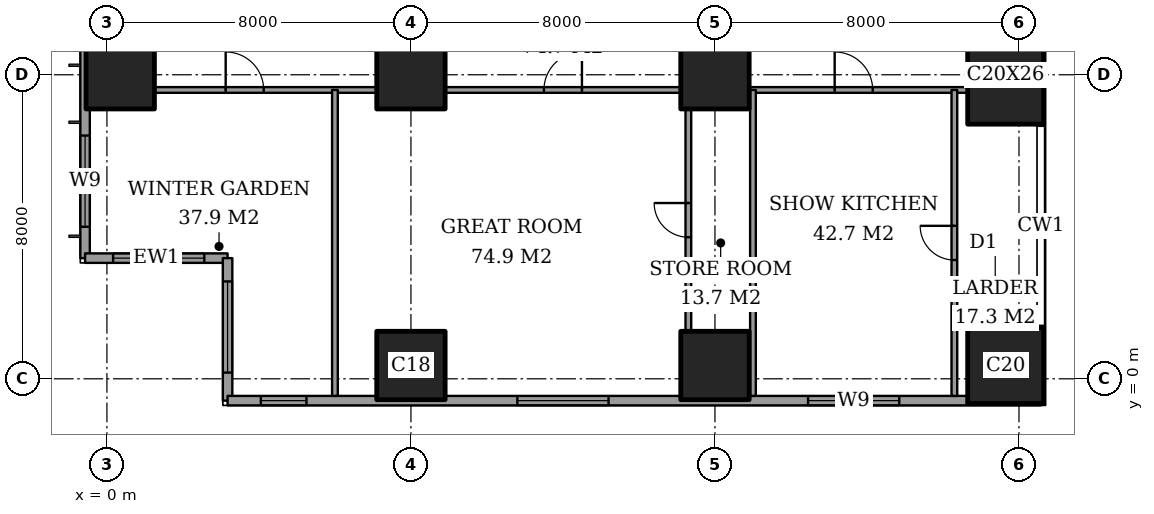
"""IFC4 building model, lengths in metres.
Left out: names, types, materials, properties, quantities, classifications, styles, units other than length and angle.
Written with IfcOpenShell. Run it as: python <this file> out.ifc"""

import sys

from ifc_helpers import new_model, si_unit, direction, frame, frame_2d, origin, origin_2d, place, context, subcontext, project, spatial, rectangle, extrude, element, fill, save


model = new_model("IFC4")
c1 = context("Model", 3, precision=1e-05, world=origin(), true_north=direction((0.0, 1.0)))
c2 = subcontext(c1, "Body", "Model", "MODEL_VIEW")
j1 = project(units=[si_unit("LENGTHUNIT", "METRE"), si_unit("PLANEANGLEUNIT", "RADIAN")], contexts=[c1])
p1 = place(None, origin())
s1 = spatial("IfcSite", under=j1, at=p1, CompositionType="ELEMENT")
p2 = place(p1, origin())
s2 = spatial("IfcBuilding", under=s1, at=p2, CompositionType="ELEMENT")
p3 = place(p2, frame((0.0, 0.0, 189.4)))
s3 = spatial("IfcBuildingStorey", under=s2, at=p3, CompositionType="ELEMENT", Elevation=189.4)
for number, where, z_axis, x_axis in (
    (1, (0.35, 8.0, 0.0), (0.0, 0.0, 1.0), (1.0, 0.0, 0.0)),
    (2, (8.0, 0.35, 0.0), (0.0, 0.0, 1.0), (1.0, 0.0, 0.0)),
    (3, (8.0, 8.0, 0.0), (0.0, 0.0, 1.0), (1.0, 0.0, 0.0)),
    (4, (16.0, 0.35, 0.0), (0.0, 0.0, 1.0), (1.0, 0.0, 0.0)),
    (5, (16.0, 8.0, 0.0), (0.0, 0.0, 1.0), (1.0, 0.0, 0.0)),
):
    element("IfcColumn", number, at=place(p3, frame(where, z_axis=z_axis, x_axis=x_axis)), inside=s3, PredefinedType="COLUMN", context=c2, shape_type="SweptSolid", body=[
        extrude(rectangle(XDim=1.8, YDim=1.8, at=origin_2d()), origin(), (0.0, 0.0, 1.0), 3.6),
    ])
p4 = place(p3, frame((23.65, 0.35, 0.0), z_axis=(0.0, 0.0, 1.0), x_axis=(1.0, 0.0, 0.0)))
e6 = element("IfcColumn", 6, at=p4, inside=s3, PredefinedType="COLUMN", context=c2, shape_type="SweptSolid", body=[
    extrude(rectangle(XDim=2.0, YDim=2.0, at=origin_2d()), origin(), (0.0, 0.0, 1.0), 3.6),
])
p5 = place(p3, frame((23.65, 8.0, 0.0), z_axis=(0.0, 0.0, 1.0), x_axis=(1.0, 0.0, 0.0)))
e7 = element("IfcColumn", 7, at=p5, inside=s3, PredefinedType="COLUMN", context=c2, shape_type="SweptSolid", body=[
    extrude(rectangle(XDim=2.0, YDim=2.6, at=origin_2d()), origin(), (0.0, 0.0, 1.0), 3.6),
])
p6 = place(p3, frame((-0.575, 44.825, 0.0), z_axis=(0.0, 0.0, 1.0), x_axis=(0.0, -1.0, 0.0)))
e8 = element("IfcWall", 8, at=p6, inside=s3, PredefinedType="SOLIDWALL", context=c2, shape_type="SweptSolid", body=[
    extrude(rectangle(XDim=41.65, YDim=0.25, at=frame_2d((20.825, 0.0))), origin(), (0.0, 0.0, 1.0), 3.6),
])
p7 = place(p6, frame((0.825, 0.0, 0.2)))
e9 = element("IfcOpeningElement", 9, at=p7, cuts=e8, PredefinedType="OPENING", context=c2, shape_type="SweptSolid", body=[
    extrude(rectangle(XDim=2.4, YDim=2.4, at=frame_2d((1.2, 1.2))), frame((0.0, 0.135, 0.0), z_axis=(0.0, -1.0, 0.0), x_axis=(1.0, 0.0, 0.0)), (0.0, 0.0, 1.0), 0.27),
])
p8 = place(p6, frame((6.05, 0.0, 0.2)))
e10 = element("IfcOpeningElement", 10, at=p8, cuts=e8, PredefinedType="OPENING", context=c2, shape_type="SweptSolid", body=[
    extrude(rectangle(XDim=1.2, YDim=2.4, at=frame_2d((0.6, 1.2))), frame((0.0, 0.135, 0.0), z_axis=(0.0, -1.0, 0.0), x_axis=(1.0, 0.0, 0.0)), (0.0, 0.0, 1.0), 0.27),
])
p9 = place(p6, frame((8.475, 0.0, 0.2)))
e11 = element("IfcOpeningElement", 11, at=p9, cuts=e8, PredefinedType="OPENING", context=c2, shape_type="SweptSolid", body=[
    extrude(rectangle(XDim=2.4, YDim=2.4, at=frame_2d((1.2, 1.2))), frame((0.0, 0.135, 0.0), z_axis=(0.0, -1.0, 0.0), x_axis=(1.0, 0.0, 0.0)), (0.0, 0.0, 1.0), 0.27),
])
p10 = place(p6, frame((15.625, 0.0, 0.2)))
e12 = element("IfcOpeningElement", 12, at=p10, cuts=e8, PredefinedType="OPENING", context=c2, shape_type="SweptSolid", body=[
    extrude(rectangle(XDim=2.4, YDim=2.4, at=frame_2d((1.2, 1.2))), frame((0.0, 0.135, 0.0), z_axis=(0.0, -1.0, 0.0), x_axis=(1.0, 0.0, 0.0)), (0.0, 0.0, 1.0), 0.27),
])
p11 = place(p6, frame((23.625, 0.0, 0.2)))
e13 = element("IfcOpeningElement", 13, at=p11, cuts=e8, PredefinedType="OPENING", context=c2, shape_type="SweptSolid", body=[
    extrude(rectangle(XDim=2.4, YDim=2.4, at=frame_2d((1.2, 1.2))), frame((0.0, 0.135, 0.0), z_axis=(0.0, -1.0, 0.0), x_axis=(1.0, 0.0, 0.0)), (0.0, 0.0, 1.0), 0.27),
])
p12 = place(p6, frame((30.775, 0.0, 0.2)))
e14 = element("IfcOpeningElement", 14, at=p12, cuts=e8, PredefinedType="OPENING", context=c2, shape_type="SweptSolid", body=[
    extrude(rectangle(XDim=2.4, YDim=2.4, at=frame_2d((1.2, 1.2))), frame((0.0, 0.135, 0.0), z_axis=(0.0, -1.0, 0.0), x_axis=(1.0, 0.0, 0.0)), (0.0, 0.0, 1.0), 0.27),
])
p13 = place(p6, frame((34.55, 0.0, 0.2)))
e15 = element("IfcOpeningElement", 15, at=p13, cuts=e8, PredefinedType="OPENING", context=c2, shape_type="SweptSolid", body=[
    extrude(rectangle(XDim=1.2, YDim=2.4, at=frame_2d((0.6, 1.2))), frame((0.0, 0.135, 0.0), z_axis=(0.0, -1.0, 0.0), x_axis=(1.0, 0.0, 0.0)), (0.0, 0.0, 1.0), 0.27),
])
p14 = place(p6, frame((38.425, 0.0, 0.2)))
e16 = element("IfcOpeningElement", 16, at=p14, cuts=e8, PredefinedType="OPENING", context=c2, shape_type="SweptSolid", body=[
    extrude(rectangle(XDim=2.4, YDim=2.4, at=frame_2d((1.2, 1.2))), frame((0.0, 0.135, 0.0), z_axis=(0.0, -1.0, 0.0), x_axis=(1.0, 0.0, 0.0)), (0.0, 0.0, 1.0), 0.27),
])
p15 = place(p3, frame((-0.575, 3.175, 0.0), z_axis=(0.0, 0.0, 1.0), x_axis=(1.0, 0.0, 0.0)))
e17 = element("IfcWall", 17, at=p15, inside=s3, PredefinedType="SOLIDWALL", context=c2, shape_type="SweptSolid", body=[
    extrude(rectangle(XDim=3.75, YDim=0.25, at=frame_2d((1.875, 0.0))), origin(), (0.0, 0.0, 1.0), 3.6),
])
p16 = place(p15, frame((0.738, 0.0, 0.2)))
e18 = element("IfcOpeningElement", 18, at=p16, cuts=e17, PredefinedType="OPENING", context=c2, shape_type="SweptSolid", body=[
    extrude(rectangle(XDim=2.4, YDim=2.4, at=frame_2d((1.2, 1.2))), frame((0.0, 0.135, 0.0), z_axis=(0.0, -1.0, 0.0), x_axis=(1.0, 0.0, 0.0)), (0.0, 0.0, 1.0), 0.27),
])
p17 = place(p3, frame((3.175, 3.175, 0.0), z_axis=(0.0, 0.0, 1.0), x_axis=(0.0, -1.0, 0.0)))
e19 = element("IfcWall", 19, at=p17, inside=s3, PredefinedType="SOLIDWALL", context=c2, shape_type="SweptSolid", body=[
    extrude(rectangle(XDim=3.75, YDim=0.25, at=frame_2d((1.875, 0.0))), origin(), (0.0, 0.0, 1.0), 3.6),
])
p18 = place(p17, frame((0.613, 0.0, 0.2)))
e20 = element("IfcOpeningElement", 20, at=p18, cuts=e19, PredefinedType="OPENING", context=c2, shape_type="SweptSolid", body=[
    extrude(rectangle(XDim=2.4, YDim=2.4, at=frame_2d((1.2, 1.2))), frame((0.0, 0.135, 0.0), z_axis=(0.0, -1.0, 0.0), x_axis=(1.0, 0.0, 0.0)), (0.0, 0.0, 1.0), 0.27),
])
p19 = place(p3, frame((3.175, -0.575, 0.0), z_axis=(0.0, 0.0, 1.0), x_axis=(1.0, 0.0, 0.0)))
e21 = element("IfcWall", 21, at=p19, inside=s3, PredefinedType="SOLIDWALL", context=c2, shape_type="SweptSolid", body=[
    extrude(rectangle(XDim=21.4, YDim=0.25, at=frame_2d((10.7, 0.0))), origin(), (0.0, 0.0, 1.0), 3.6),
])
p20 = place(p19, frame((0.875, 0.0, 0.2)))
e22 = element("IfcOpeningElement", 22, at=p20, cuts=e21, PredefinedType="OPENING", context=c2, shape_type="SweptSolid", body=[
    extrude(rectangle(XDim=1.2, YDim=2.4, at=frame_2d((0.6, 1.2))), frame((0.0, 0.135, 0.0), z_axis=(0.0, -1.0, 0.0), x_axis=(1.0, 0.0, 0.0)), (0.0, 0.0, 1.0), 0.27),
])
p21 = place(p19, frame((7.625, 0.0, 0.2)))
e23 = element("IfcOpeningElement", 23, at=p21, cuts=e21, PredefinedType="OPENING", context=c2, shape_type="SweptSolid", body=[
    extrude(rectangle(XDim=2.4, YDim=2.4, at=frame_2d((1.2, 1.2))), frame((0.0, 0.135, 0.0), z_axis=(0.0, -1.0, 0.0), x_axis=(1.0, 0.0, 0.0)), (0.0, 0.0, 1.0), 0.27),
])
p22 = place(p19, frame((15.275, 0.0, 0.2)))
e24 = element("IfcOpeningElement", 24, at=p22, cuts=e21, PredefinedType="OPENING", context=c2, shape_type="SweptSolid", body=[
    extrude(rectangle(XDim=2.4, YDim=2.4, at=frame_2d((1.2, 1.2))), frame((0.0, 0.135, 0.0), z_axis=(0.0, -1.0, 0.0), x_axis=(1.0, 0.0, 0.0)), (0.0, 0.0, 1.0), 0.27),
])
p23 = place(p3, frame((1.25, 7.6, 0.0), z_axis=(0.0, 0.0, 1.0), x_axis=(1.0, 0.0, 0.0)))
e25 = element("IfcWall", 25, at=p23, inside=s3, PredefinedType="PARTITIONING", context=c2, shape_type="SweptSolid", body=[
    extrude(rectangle(XDim=5.85, YDim=0.15, at=frame_2d((2.925, 0.0))), origin(), (0.0, 0.0, 1.0), 3.35),
])
p24 = place(p23, frame((1.875, 0.0, 0.0)))
e26 = element("IfcOpeningElement", 26, at=p24, cuts=e25, PredefinedType="OPENING", context=c2, shape_type="SweptSolid", body=[
    extrude(rectangle(XDim=1.0, YDim=2.1, at=frame_2d((0.5, 1.05))), frame((0.0, 0.085, 0.0), z_axis=(0.0, -1.0, 0.0), x_axis=(1.0, 0.0, 0.0)), (0.0, 0.0, 1.0), 0.17),
])
p25 = place(p3, frame((8.9, 7.6, 0.0), z_axis=(0.0, 0.0, 1.0), x_axis=(1.0, 0.0, 0.0)))
e27 = element("IfcWall", 27, at=p25, inside=s3, PredefinedType="PARTITIONING", context=c2, shape_type="SweptSolid", body=[
    extrude(rectangle(XDim=6.2, YDim=0.15, at=frame_2d((3.1, 0.0))), origin(), (0.0, 0.0, 1.0), 3.35),
])
p26 = place(p25, frame((2.6, 0.0, 0.0)))
e28 = element("IfcOpeningElement", 28, at=p26, cuts=e27, PredefinedType="OPENING", context=c2, shape_type="SweptSolid", body=[
    extrude(rectangle(XDim=1.0, YDim=2.1, at=frame_2d((0.5, 1.05))), frame((0.0, 0.085, 0.0), z_axis=(0.0, -1.0, 0.0), x_axis=(1.0, 0.0, 0.0)), (0.0, 0.0, 1.0), 0.17),
])
p27 = place(p3, frame((16.9, 7.6, 0.0), z_axis=(0.0, 0.0, 1.0), x_axis=(1.0, 0.0, 0.0)))
e29 = element("IfcWall", 29, at=p27, inside=s3, PredefinedType="PARTITIONING", context=c2, shape_type="SweptSolid", body=[
    extrude(rectangle(XDim=5.75, YDim=0.15, at=frame_2d((2.875, 0.0))), origin(), (0.0, 0.0, 1.0), 3.35),
])
p28 = place(p27, frame((2.25, 0.0, 0.0)))
e30 = element("IfcOpeningElement", 30, at=p28, cuts=e29, PredefinedType="OPENING", context=c2, shape_type="SweptSolid", body=[
    extrude(rectangle(XDim=1.0, YDim=2.1, at=frame_2d((0.5, 1.05))), frame((0.0, 0.085, 0.0), z_axis=(0.0, -1.0, 0.0), x_axis=(1.0, 0.0, 0.0)), (0.0, 0.0, 1.0), 0.17),
])
p29 = place(p3, frame((6.0, -0.45, 0.0), z_axis=(0.0, 0.0, 1.0), x_axis=(0.0, 1.0, 0.0)))
e31 = element("IfcWall", 31, at=p29, inside=s3, PredefinedType="PARTITIONING", context=c2, shape_type="SweptSolid", body=[
    extrude(rectangle(XDim=8.05, YDim=0.15, at=frame_2d((4.025, 0.0))), origin(), (0.0, 0.0, 1.0), 3.35),
])
p30 = place(p3, frame((15.3, 1.25, 0.0), z_axis=(0.0, 0.0, 1.0), x_axis=(0.0, 1.0, 0.0)))
e32 = element("IfcWall", 32, at=p30, inside=s3, PredefinedType="PARTITIONING", context=c2, shape_type="SweptSolid", body=[
    extrude(rectangle(XDim=5.85, YDim=0.15, at=frame_2d((2.925, 0.0))), origin(), (0.0, 0.0, 1.0), 3.35),
])
p31 = place(p30, frame((2.475, 0.0, 0.0)))
e33 = element("IfcOpeningElement", 33, at=p31, cuts=e32, PredefinedType="OPENING", context=c2, shape_type="SweptSolid", body=[
    extrude(rectangle(XDim=0.9, YDim=2.1, at=frame_2d((0.45, 1.05))), frame((0.0, 0.085, 0.0), z_axis=(0.0, -1.0, 0.0), x_axis=(1.0, 0.0, 0.0)), (0.0, 0.0, 1.0), 0.17),
])
p32 = place(p3, frame((17.0, -0.45, 0.0), z_axis=(0.0, 0.0, 1.0), x_axis=(0.0, 1.0, 0.0)))
e34 = element("IfcWall", 34, at=p32, inside=s3, PredefinedType="PARTITIONING", context=c2, shape_type="SweptSolid", body=[
    extrude(rectangle(XDim=8.05, YDim=0.15, at=frame_2d((4.025, 0.0))), origin(), (0.0, 0.0, 1.0), 3.35),
])
p33 = place(p3, frame((22.3, -0.45, 0.0), z_axis=(0.0, 0.0, 1.0), x_axis=(0.0, 1.0, 0.0)))
e35 = element("IfcWall", 35, at=p33, inside=s3, PredefinedType="PARTITIONING", context=c2, shape_type="SweptSolid", body=[
    extrude(rectangle(XDim=8.05, YDim=0.15, at=frame_2d((4.025, 0.0))), origin(), (0.0, 0.0, 1.0), 3.35),
])
p34 = place(p33, frame((3.575, 0.0, 0.0)))
e36 = element("IfcOpeningElement", 36, at=p34, cuts=e35, PredefinedType="OPENING", context=c2, shape_type="SweptSolid", body=[
    extrude(rectangle(XDim=0.9, YDim=2.1, at=frame_2d((0.45, 1.05))), frame((0.0, 0.085, 0.0), z_axis=(0.0, -1.0, 0.0), x_axis=(1.0, 0.0, 0.0)), (0.0, 0.0, 1.0), 0.17),
])
p35 = place(p14, origin())
e37 = element("IfcWindow", 37, at=p35, inside=s3, PartitioningType="SINGLE_PANEL", PredefinedType="WINDOW", context=c2, shape_type="SweptSolid", body=[
    extrude(rectangle(XDim=2.4, YDim=2.4, at=frame_2d((1.2, 1.2))), frame((0.0, 0.03, 0.0), z_axis=(0.0, -1.0, 0.0), x_axis=(1.0, 0.0, 0.0)), (0.0, 0.0, 1.0), 0.06),
])
fill(e16, e37)
p36 = place(p16, origin())
e38 = element("IfcWindow", 38, at=p36, inside=s3, PartitioningType="SINGLE_PANEL", PredefinedType="WINDOW", context=c2, shape_type="SweptSolid", body=[
    extrude(rectangle(XDim=2.4, YDim=2.4, at=frame_2d((1.2, 1.2))), frame((0.0, 0.03, 0.0), z_axis=(0.0, -1.0, 0.0), x_axis=(1.0, 0.0, 0.0)), (0.0, 0.0, 1.0), 0.06),
])
fill(e18, e38)
p37 = place(p18, origin())
e39 = element("IfcWindow", 39, at=p37, inside=s3, PartitioningType="SINGLE_PANEL", PredefinedType="WINDOW", context=c2, shape_type="SweptSolid", body=[
    extrude(rectangle(XDim=2.4, YDim=2.4, at=frame_2d((1.2, 1.2))), frame((0.0, 0.03, 0.0), z_axis=(0.0, -1.0, 0.0), x_axis=(1.0, 0.0, 0.0)), (0.0, 0.0, 1.0), 0.06),
])
fill(e20, e39)
p38 = place(p20, origin())
e40 = element("IfcWindow", 40, at=p38, inside=s3, PartitioningType="SINGLE_PANEL", PredefinedType="WINDOW", context=c2, shape_type="SweptSolid", body=[
    extrude(rectangle(XDim=1.2, YDim=2.4, at=frame_2d((0.6, 1.2))), frame((0.0, 0.03, 0.0), z_axis=(0.0, -1.0, 0.0), x_axis=(1.0, 0.0, 0.0)), (0.0, 0.0, 1.0), 0.06),
])
fill(e22, e40)
p39 = place(p21, origin())
e41 = element("IfcWindow", 41, at=p39, inside=s3, PartitioningType="SINGLE_PANEL", PredefinedType="WINDOW", context=c2, shape_type="SweptSolid", body=[
    extrude(rectangle(XDim=2.4, YDim=2.4, at=frame_2d((1.2, 1.2))), frame((0.0, 0.03, 0.0), z_axis=(0.0, -1.0, 0.0), x_axis=(1.0, 0.0, 0.0)), (0.0, 0.0, 1.0), 0.06),
])
fill(e23, e41)
p40 = place(p22, origin())
e42 = element("IfcWindow", 42, at=p40, inside=s3, PartitioningType="SINGLE_PANEL", PredefinedType="WINDOW", context=c2, shape_type="SweptSolid", body=[
    extrude(rectangle(XDim=2.4, YDim=2.4, at=frame_2d((1.2, 1.2))), frame((0.0, 0.03, 0.0), z_axis=(0.0, -1.0, 0.0), x_axis=(1.0, 0.0, 0.0)), (0.0, 0.0, 1.0), 0.06),
])
fill(e24, e42)
p41 = place(p24, origin())
e43 = element("IfcDoor", 43, at=p41, inside=s3, OperationType="SINGLE_SWING_RIGHT", PredefinedType="DOOR", context=c2, shape_type="SweptSolid", body=[
    extrude(rectangle(XDim=1.0, YDim=2.1, at=frame_2d((0.5, 1.05))), frame((0.0, 0.025, 0.0), z_axis=(0.0, -1.0, 0.0), x_axis=(1.0, 0.0, 0.0)), (0.0, 0.0, 1.0), 0.05),
])
fill(e26, e43)
p42 = place(p26, origin())
e44 = element("IfcDoor", 44, at=p42, inside=s3, OperationType="SINGLE_SWING_LEFT", PredefinedType="DOOR", context=c2, shape_type="SweptSolid", body=[
    extrude(rectangle(XDim=1.0, YDim=2.1, at=frame_2d((0.5, 1.05))), frame((0.0, 0.025, 0.0), z_axis=(0.0, -1.0, 0.0), x_axis=(1.0, 0.0, 0.0)), (0.0, 0.0, 1.0), 0.05),
])
fill(e28, e44)
p43 = place(p31, origin())
e45 = element("IfcDoor", 45, at=p43, inside=s3, OperationType="SINGLE_SWING_LEFT", PredefinedType="DOOR", context=c2, shape_type="SweptSolid", body=[
    extrude(rectangle(XDim=0.9, YDim=2.1, at=frame_2d((0.45, 1.05))), frame((0.0, 0.025, 0.0), z_axis=(0.0, -1.0, 0.0), x_axis=(1.0, 0.0, 0.0)), (0.0, 0.0, 1.0), 0.05),
])
fill(e33, e45)
p44 = place(p28, origin())
e46 = element("IfcDoor", 46, at=p44, inside=s3, OperationType="SINGLE_SWING_RIGHT", PredefinedType="DOOR", context=c2, shape_type="SweptSolid", body=[
    extrude(rectangle(XDim=1.0, YDim=2.1, at=frame_2d((0.5, 1.05))), frame((0.0, 0.025, 0.0), z_axis=(0.0, -1.0, 0.0), x_axis=(1.0, 0.0, 0.0)), (0.0, 0.0, 1.0), 0.05),
])
fill(e30, e46)
p45 = place(p34, origin())
e47 = element("IfcDoor", 47, at=p45, inside=s3, OperationType="SINGLE_SWING_LEFT", PredefinedType="DOOR", context=c2, shape_type="SweptSolid", body=[
    extrude(rectangle(XDim=0.9, YDim=2.1, at=frame_2d((0.45, 1.05))), frame((0.0, 0.025, 0.0), z_axis=(0.0, -1.0, 0.0), x_axis=(1.0, 0.0, 0.0)), (0.0, 0.0, 1.0), 0.05),
])
fill(e36, e47)
save(model, sys.argv[1])
